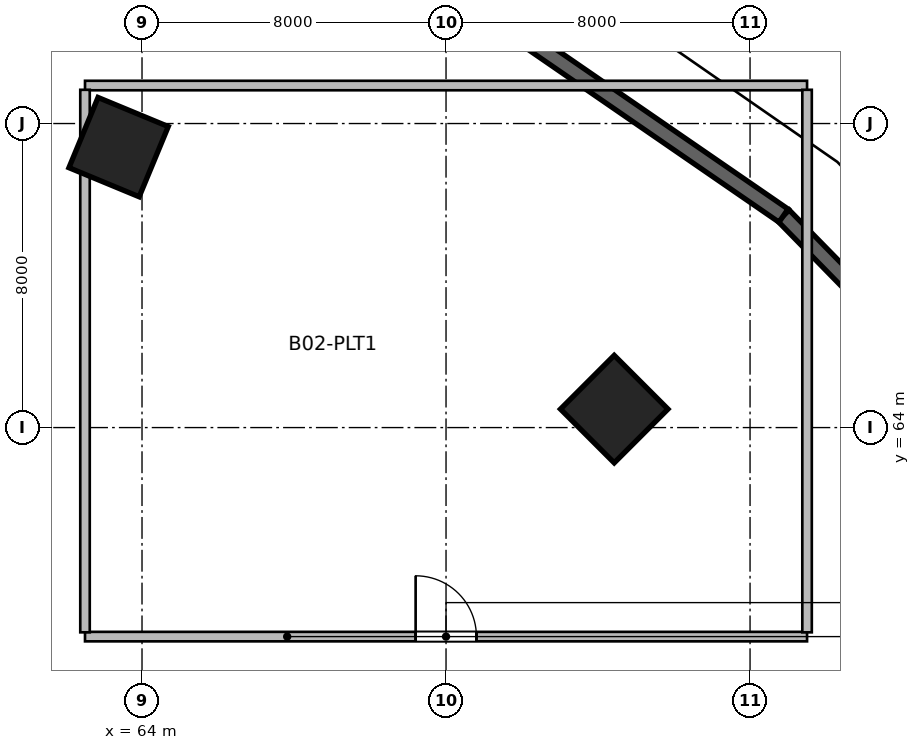
"""IFC4 building model, lengths in metres.
Left out: names, types, materials, properties, quantities, classifications, styles, units other than length and angle.
Written with IfcOpenShell. Run it as: python <this file> out.ifc"""

import sys

from ifc_helpers import new_model, si_unit, direction, frame, frame_2d, origin, origin_2d, place, context, subcontext, project, spatial, rectangle, extrude, source, transform, mapped, element, fill, save


model = new_model("IFC4")
c1 = context("Model", 3, precision=1e-05, world=origin(), true_north=direction((0.0, 1.0)))
c2 = subcontext(c1, "Body", "Model", "MODEL_VIEW")
j1 = project(units=[si_unit("LENGTHUNIT", "METRE"), si_unit("PLANEANGLEUNIT", "RADIAN")], contexts=[c1])
p1 = place(None, origin())
s1 = spatial("IfcSite", under=j1, at=p1, CompositionType="ELEMENT")
p2 = place(p1, origin())
s2 = spatial("IfcBuilding", under=s1, at=p2, CompositionType="ELEMENT")
p3 = place(p2, frame((0.0, 0.0, -10.0)))
s3 = spatial("IfcBuildingStorey", under=s2, at=p3, CompositionType="ELEMENT", Elevation=-10.0)
m1 = source(origin(), c2, "Body", "SweptSolid", [
    extrude(rectangle(XDim=8.268, YDim=0.42, at=frame_2d((4.134, 0.0))), origin(), (0.0, 0.0, 1.0), 5.0),
])
p4 = place(p3, frame((86.663, 63.667, 0.0), z_axis=(0.0, 0.0, 1.0), x_axis=(-0.699373198463, 0.714756692358, 0.0)))
e1 = element("IfcWall", 1, at=p4, inside=s3, PredefinedType="USERDEFINED", context=c2, shape_type="MappedRepresentation", body=[
    mapped(m1, transform((0.0, 0.0, 0.0), scale=1.0)),
])
m2 = source(origin(), c2, "Body", "SweptSolid", [
    extrude(rectangle(XDim=8.554, YDim=0.42, at=frame_2d((4.277, 0.0))), origin(), (0.0, 0.0, 1.0), 5.0),
])
p5 = place(p3, frame((80.881, 69.577, 0.0), z_axis=(0.0, 0.0, 1.0), x_axis=(-0.823739529001, 0.566968419192, 0.0)))
e2 = element("IfcWall", 2, at=p5, inside=s3, PredefinedType="USERDEFINED", context=c2, shape_type="MappedRepresentation", body=[
    mapped(m2, transform((0.0, 0.0, 0.0), scale=1.0)),
])
m3 = source(origin(), c2, "Body", "SweptSolid", [
    extrude(rectangle(XDim=2.0, YDim=2.0, at=origin_2d()), origin(), (0.0, 0.0, 1.0), 5.0),
])
for number, where, z_axis, x_axis in (
    (3, (76.426, 64.486, 0.0), (0.0, 0.0, 1.0), (0.707, 0.707, 0.0)),
    (4, (63.384, 71.379, 0.0), (0.0, 0.0, 1.0), (0.383, 0.924, 0.0)),
):
    element("IfcColumn", number, at=place(p3, frame(where, z_axis=z_axis, x_axis=x_axis)), inside=s3, PredefinedType="COLUMN", context=c2, shape_type="MappedRepresentation", body=[
        mapped(m3, transform((0.0, 0.0, 0.0), scale=1.0)),
    ])
m4 = source(origin(), c2, "Body", "SweptSolid", [
    extrude(rectangle(XDim=19.0, YDim=0.25, at=frame_2d((9.5, 0.0))), origin(), (0.0, 0.0, 1.0), 3.78),
])
p6 = place(p3, frame((62.5, 58.5, 0.0), z_axis=(0.0, 0.0, 1.0), x_axis=(1.0, 0.0, 0.0)))
e5 = element("IfcWall", 5, at=p6, inside=s3, PredefinedType="PARTITIONING", context=c2, shape_type="MappedRepresentation", body=[
    mapped(m4, transform((0.0, 0.0, 0.0), scale=1.0)),
])
p7 = place(p6, frame((8.7, 0.0, 0.0)))
e6 = element("IfcOpeningElement", 6, at=p7, cuts=e5, PredefinedType="OPENING", context=c2, shape_type="SweptSolid", body=[
    extrude(rectangle(XDim=1.6, YDim=2.15, at=frame_2d((0.8, 1.075))), frame((0.0, 0.135, 0.0), z_axis=(0.0, -1.0, 0.0), x_axis=(1.0, 0.0, 0.0)), (0.0, 0.0, 1.0), 0.27),
])
m5 = source(origin(), c2, "Body", "SweptSolid", [
    extrude(rectangle(XDim=19.0, YDim=0.25, at=frame_2d((9.5, 0.0))), origin(), (0.0, 0.0, 1.0), 4.7),
])
p8 = place(p3, frame((62.5, 73.0, 0.0), z_axis=(0.0, 0.0, 1.0), x_axis=(1.0, 0.0, 0.0)))
e7 = element("IfcWall", 7, at=p8, inside=s3, PredefinedType="PARTITIONING", context=c2, shape_type="MappedRepresentation", body=[
    mapped(m5, transform((0.0, 0.0, 0.0), scale=1.0)),
])
m6 = source(origin(), c2, "Body", "SweptSolid", [
    extrude(rectangle(XDim=14.275, YDim=0.25, at=frame_2d((7.137, 0.0))), origin(), (0.0, 0.0, 1.0), 4.7),
])
for number, where, z_axis, x_axis in (
    (8, (62.5, 58.613, 0.0), (0.0, 0.0, 1.0), (0.0, 1.0, 0.0)),
    (9, (81.5, 58.613, 0.0), (0.0, 0.0, 1.0), (0.0, 1.0, 0.0)),
):
    element("IfcWall", number, at=place(p3, frame(where, z_axis=z_axis, x_axis=x_axis)), inside=s3, PredefinedType="PARTITIONING", context=c2, shape_type="MappedRepresentation", body=[
        mapped(m6, transform((0.0, 0.0, 0.0), scale=1.0)),
    ])
m7 = source(origin(), c2, "Body", "SweptSolid", [
    extrude(rectangle(XDim=1.6, YDim=2.15, at=frame_2d((0.8, 1.075))), frame((0.0, 0.025, 0.0), z_axis=(0.0, -1.0, 0.0), x_axis=(1.0, 0.0, 0.0)), (0.0, 0.0, 1.0), 0.05),
])
p9 = place(p7, origin())
e10 = element("IfcDoor", 10, at=p9, inside=s3, OperationType="SINGLE_SWING_LEFT", PredefinedType="DOOR", context=c2, shape_type="MappedRepresentation", body=[
    mapped(m7, transform((0.0, 0.0, 0.0), scale=1.0)),
])
fill(e6, e10)
save(model, sys.argv[1])
